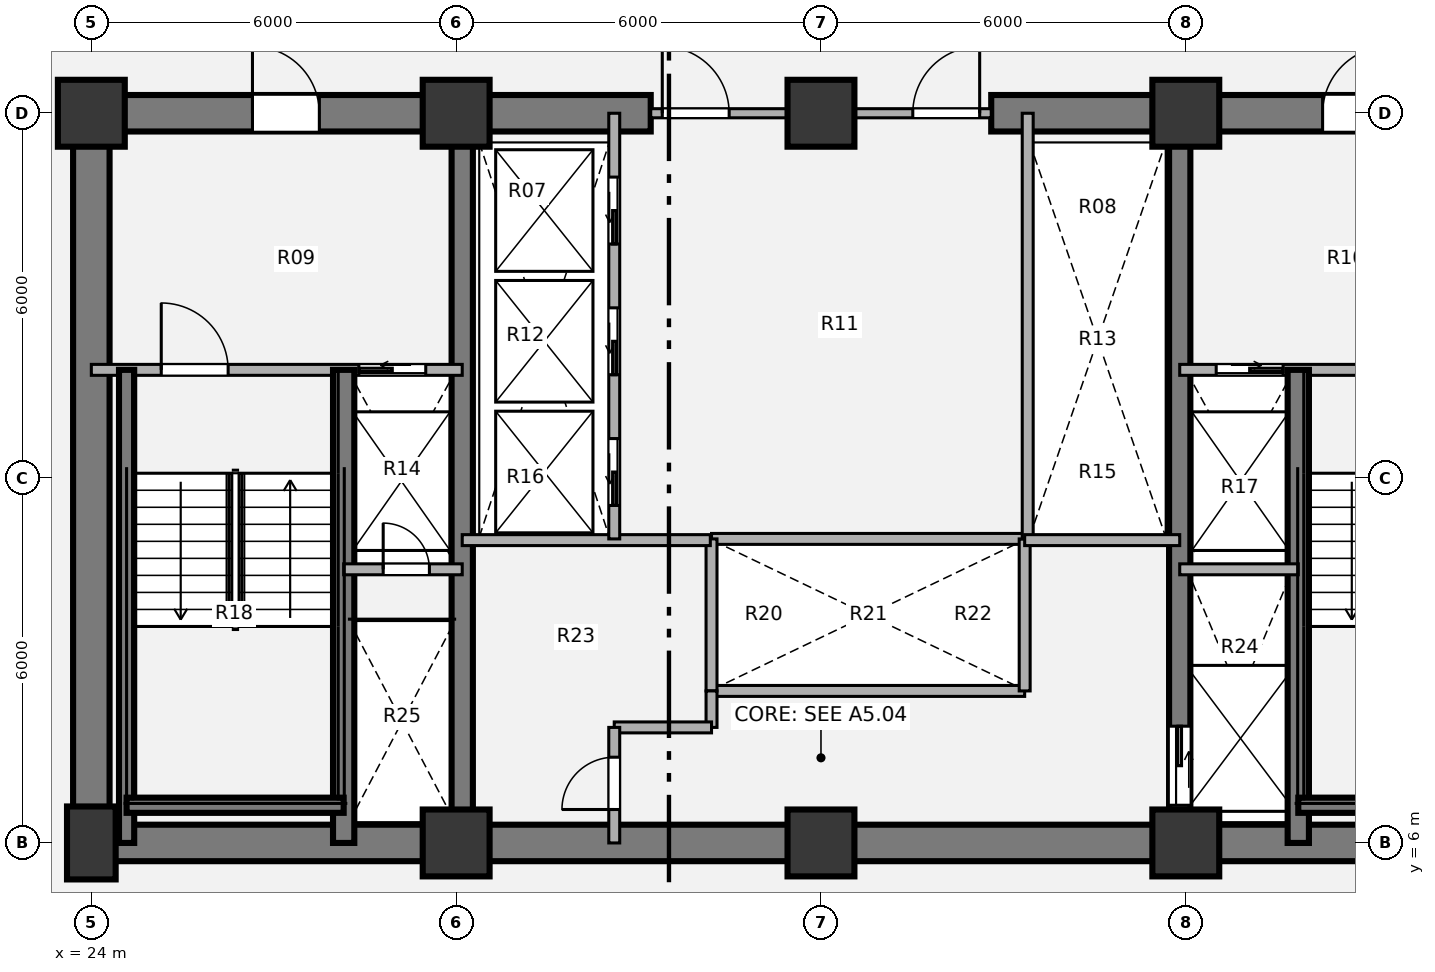
"""IFC4 building model, lengths in metres.
Left out: names, types, materials, properties, quantities, classifications, styles, units other than length and angle.
Written with IfcOpenShell. Run it as: python <this file> out.ifc"""

import sys

from ifc_helpers import new_model, si_unit, direction, frame, frame_2d, origin, origin_2d, place, context, subcontext, project, spatial, rectangle, extrude, source, transform, mapped, element, fill, save


model = new_model("IFC4")
c1 = context("Model", 3, precision=1e-05, world=origin(), true_north=direction((0.0, 1.0)))
c2 = subcontext(c1, "Body", "Model", "MODEL_VIEW")
j1 = project(units=[si_unit("LENGTHUNIT", "METRE"), si_unit("PLANEANGLEUNIT", "RADIAN")], contexts=[c1])
p1 = place(None, origin())
s1 = spatial("IfcSite", under=j1, at=p1, CompositionType="ELEMENT")
p2 = place(p1, origin())
s2 = spatial("IfcBuilding", under=s1, at=p2, CompositionType="ELEMENT")
p3 = place(p2, frame((0.0, 0.0, 27.0)))
s3 = spatial("IfcBuildingStorey", under=s2, at=p3, CompositionType="ELEMENT", Elevation=27.0)
m1 = source(origin(), c2, "Body", "SweptSolid", [
    extrude(rectangle(XDim=0.8, YDim=1.2, at=origin_2d()), origin(), (0.0, 0.0, 1.0), 3.78),
])
p4 = place(p3, frame((24.0, 6.0, 0.0), z_axis=(0.0, 0.0, 1.0), x_axis=(1.0, 0.0, 0.0)))
e1 = element("IfcColumn", 1, at=p4, inside=s3, PredefinedType="COLUMN", context=c2, shape_type="MappedRepresentation", body=[
    mapped(m1, transform((0.0, 0.0, 0.0), x_axis=(1.0, 0.0, 0.0), y_axis=(0.0, 1.0, 0.0), z_axis=(0.0, 0.0, 1.0), scale=1.0)),
])
m2 = source(origin(), c2, "Body", "SweptSolid", [
    extrude(rectangle(XDim=1.1, YDim=1.1, at=origin_2d()), origin(), (0.0, 0.0, 1.0), 3.78),
])
for number, where, z_axis, x_axis in (
    (2, (30.0, 6.0, 0.0), (0.0, 0.0, 1.0), (1.0, 0.0, 0.0)),
    (3, (36.0, 6.0, 0.0), (0.0, 0.0, 1.0), (1.0, 0.0, 0.0)),
    (4, (42.0, 6.0, 0.0), (0.0, 0.0, 1.0), (1.0, 0.0, 0.0)),
    (5, (24.0, 18.0, 0.0), (0.0, 0.0, 1.0), (1.0, 0.0, 0.0)),
    (6, (30.0, 18.0, 0.0), (0.0, 0.0, 1.0), (1.0, 0.0, 0.0)),
    (7, (36.0, 18.0, 0.0), (0.0, 0.0, 1.0), (1.0, 0.0, 0.0)),
    (8, (42.0, 18.0, 0.0), (0.0, 0.0, 1.0), (1.0, 0.0, 0.0)),
):
    element("IfcColumn", number, at=place(p3, frame(where, z_axis=z_axis, x_axis=x_axis)), inside=s3, PredefinedType="COLUMN", context=c2, shape_type="MappedRepresentation", body=[
        mapped(m2, transform((0.0, 0.0, 0.0), x_axis=(1.0, 0.0, 0.0), y_axis=(0.0, 1.0, 0.0), z_axis=(0.0, 0.0, 1.0), scale=1.0)),
    ])
p5 = place(p3, frame((48.3, 6.0, 0.0), z_axis=(0.0, 0.0, 1.0), x_axis=(-1.0, 0.0, 0.0)))
e9 = element("IfcWall", 9, at=p5, inside=s3, PredefinedType="SHEAR", context=c2, shape_type="SweptSolid", body=[
    extrude(rectangle(XDim=24.6, YDim=0.6, at=frame_2d((12.3, 0.0))), origin(), (0.0, 0.0, 1.0), 3.78),
])
p6 = place(p3, frame((24.0, 6.0, 0.0), z_axis=(0.0, 0.0, 1.0), x_axis=(0.0, 1.0, 0.0)))
e10 = element("IfcWall", 10, at=p6, inside=s3, PredefinedType="SHEAR", context=c2, shape_type="SweptSolid", body=[
    extrude(rectangle(XDim=12.0, YDim=0.6, at=frame_2d((6.0, 0.0))), origin(), (0.0, 0.0, 1.0), 3.78),
])
p7 = place(p3, frame((23.7, 18.0, 0.0), z_axis=(0.0, 0.0, 1.0), x_axis=(1.0, 0.0, 0.0)))
e11 = element("IfcWall", 11, at=p7, inside=s3, PredefinedType="SHEAR", context=c2, shape_type="SweptSolid", body=[
    extrude(rectangle(XDim=9.5, YDim=0.6, at=frame_2d((4.75, 0.0))), origin(), (0.0, 0.0, 1.0), 3.78),
])
p8 = place(p7, frame((2.95, 0.0, 0.0)))
e12 = element("IfcOpeningElement", 12, at=p8, cuts=e11, PredefinedType="OPENING", context=c2, shape_type="SweptSolid", body=[
    extrude(rectangle(XDim=1.1, YDim=2.1, at=origin_2d()), frame((0.55, 0.31, 1.05), z_axis=(0.0, -1.0, 0.0), x_axis=(1.0, 0.0, 0.0)), (0.0, 0.0, 1.0), 0.62),
])
p9 = place(p3, frame((38.8, 18.0, 0.0), z_axis=(0.0, 0.0, 1.0), x_axis=(1.0, 0.0, 0.0)))
e13 = element("IfcWall", 13, at=p9, inside=s3, PredefinedType="SHEAR", context=c2, shape_type="SweptSolid", body=[
    extrude(rectangle(XDim=9.5, YDim=0.6, at=frame_2d((4.75, 0.0))), origin(), (0.0, 0.0, 1.0), 3.78),
])
p10 = place(p9, frame((5.45, 0.0, 0.0)))
e14 = element("IfcOpeningElement", 14, at=p10, cuts=e13, PredefinedType="OPENING", context=c2, shape_type="SweptSolid", body=[
    extrude(rectangle(XDim=1.1, YDim=2.1, at=origin_2d()), frame((0.55, 0.31, 1.05), z_axis=(0.0, -1.0, 0.0), x_axis=(1.0, 0.0, 0.0)), (0.0, 0.0, 1.0), 0.62),
])
p11 = place(p3, frame((30.1, 6.0, 0.0), z_axis=(0.0, 0.0, 1.0), x_axis=(0.0, 1.0, 0.0)))
e15 = element("IfcWall", 15, at=p11, inside=s3, PredefinedType="SHEAR", context=c2, shape_type="SweptSolid", body=[
    extrude(rectangle(XDim=12.0, YDim=0.35, at=frame_2d((6.0, 0.0))), origin(), (0.0, 0.0, 1.0), 3.78),
])
p12 = place(p3, frame((41.9, 18.0, 0.0), z_axis=(0.0, 0.0, 1.0), x_axis=(0.0, -1.0, 0.0)))
e16 = element("IfcWall", 16, at=p12, inside=s3, PredefinedType="SHEAR", context=c2, shape_type="SweptSolid", body=[
    extrude(rectangle(XDim=12.0, YDim=0.35, at=frame_2d((6.0, 0.0))), origin(), (0.0, 0.0, 1.0), 3.78),
])
p13 = place(p12, frame((10.08, 0.0, 0.0)))
e17 = element("IfcOpeningElement", 17, at=p13, cuts=e16, PredefinedType="OPENING", context=c2, shape_type="SweptSolid", body=[
    extrude(rectangle(XDim=1.3, YDim=2.1, at=origin_2d()), frame((0.65, 0.185, 1.05), z_axis=(0.0, -1.0, 0.0), x_axis=(1.0, 0.0, 0.0)), (0.0, 0.0, 1.0), 0.37),
])
for number, where, z_axis, x_axis in (
    (18, (34.2, 11.0, 0.0), (0.0, 0.0, 1.0), (1.0, 0.0, 0.0)),
    (19, (34.2, 8.5, 0.0), (0.0, 0.0, 1.0), (1.0, 0.0, 0.0)),
):
    element("IfcWall", number, at=place(p3, frame(where, z_axis=z_axis, x_axis=x_axis)), inside=s3, PredefinedType="PARTITIONING", context=c2, shape_type="SweptSolid", body=[
        extrude(rectangle(XDim=5.15, YDim=0.18, at=frame_2d((2.575, 0.0))), origin(), (0.0, 0.0, 1.0), 3.5),
    ])
for number, where, z_axis, x_axis in (
    (20, (34.2, 8.5, 0.0), (0.0, 0.0, 1.0), (0.0, 1.0, 0.0)),
    (21, (39.35, 8.5, 0.0), (0.0, 0.0, 1.0), (0.0, 1.0, 0.0)),
):
    element("IfcWall", number, at=place(p3, frame(where, z_axis=z_axis, x_axis=x_axis)), inside=s3, PredefinedType="PARTITIONING", context=c2, shape_type="SweptSolid", body=[
        extrude(rectangle(XDim=2.5, YDim=0.18, at=frame_2d((1.25, 0.0))), origin(), (0.0, 0.0, 1.0), 3.5),
    ])
p14 = place(p3, frame((39.4, 11.0, 0.0), z_axis=(0.0, 0.0, 1.0), x_axis=(0.0, 1.0, 0.0)))
e22 = element("IfcWall", 22, at=p14, inside=s3, PredefinedType="PARTITIONING", context=c2, shape_type="SweptSolid", body=[
    extrude(rectangle(XDim=7.0, YDim=0.18, at=frame_2d((3.5, 0.0))), origin(), (0.0, 0.0, 1.0), 3.5),
])
p15 = place(p3, frame((30.1, 10.98, 0.0), z_axis=(0.0, 0.0, 1.0), x_axis=(1.0, 0.0, 0.0)))
e23 = element("IfcWall", 23, at=p15, inside=s3, PredefinedType="PARTITIONING", context=c2, shape_type="SweptSolid", body=[
    extrude(rectangle(XDim=4.08, YDim=0.18, at=frame_2d((2.04, 0.0))), origin(), (0.0, 0.0, 1.0), 3.5),
])
p16 = place(p3, frame((34.2, 7.9, 0.0), z_axis=(0.0, 0.0, 1.0), x_axis=(0.0, 1.0, 0.0)))
e24 = element("IfcWall", 24, at=p16, inside=s3, PredefinedType="PARTITIONING", context=c2, shape_type="SweptSolid", body=[
    extrude(rectangle(XDim=0.6, YDim=0.18, at=frame_2d((0.3, 0.0))), origin(), (0.0, 0.0, 1.0), 3.5),
])
p17 = place(p3, frame((32.6, 7.9, 0.0), z_axis=(0.0, 0.0, 1.0), x_axis=(1.0, 0.0, 0.0)))
e25 = element("IfcWall", 25, at=p17, inside=s3, PredefinedType="PARTITIONING", context=c2, shape_type="SweptSolid", body=[
    extrude(rectangle(XDim=1.6, YDim=0.18, at=frame_2d((0.8, 0.0))), origin(), (0.0, 0.0, 1.0), 3.5),
])
p18 = place(p3, frame((32.6, 6.0, 0.0), z_axis=(0.0, 0.0, 1.0), x_axis=(0.0, 1.0, 0.0)))
e26 = element("IfcWall", 26, at=p18, inside=s3, PredefinedType="PARTITIONING", context=c2, shape_type="SweptSolid", body=[
    extrude(rectangle(XDim=1.9, YDim=0.18, at=frame_2d((0.95, 0.0))), origin(), (0.0, 0.0, 1.0), 3.5),
])
p19 = place(p18, frame((0.55, 0.0, 0.0)))
e27 = element("IfcOpeningElement", 27, at=p19, cuts=e26, PredefinedType="OPENING", context=c2, shape_type="SweptSolid", body=[
    extrude(rectangle(XDim=0.86, YDim=2.1, at=origin_2d()), frame((0.43, 0.1, 1.05), z_axis=(0.0, -1.0, 0.0), x_axis=(1.0, 0.0, 0.0)), (0.0, 0.0, 1.0), 0.2),
])
p20 = place(p3, frame((39.35, 10.98, 0.0), z_axis=(0.0, 0.0, 1.0), x_axis=(1.0, 0.0, 0.0)))
e28 = element("IfcWall", 28, at=p20, inside=s3, PredefinedType="PARTITIONING", context=c2, shape_type="SweptSolid", body=[
    extrude(rectangle(XDim=2.55, YDim=0.18, at=frame_2d((1.275, 0.0))), origin(), (0.0, 0.0, 1.0), 3.5),
])
p21 = place(p3, frame((33.2, 18.0, 0.0), z_axis=(0.0, 0.0, 1.0), x_axis=(1.0, 0.0, 0.0)))
e29 = element("IfcWall", 29, at=p21, inside=s3, PredefinedType="PARTITIONING", context=c2, shape_type="SweptSolid", body=[
    extrude(rectangle(XDim=5.6, YDim=0.15, at=frame_2d((2.8, 0.0))), origin(), (0.0, 0.0, 1.0), 2.315),
])
p22 = place(p21, frame((0.19, 0.0, 0.0)))
e30 = element("IfcOpeningElement", 30, at=p22, cuts=e29, PredefinedType="OPENING", context=c2, shape_type="SweptSolid", body=[
    extrude(rectangle(XDim=1.1, YDim=2.1, at=origin_2d()), frame((0.55, 0.085, 1.05), z_axis=(0.0, -1.0, 0.0), x_axis=(1.0, 0.0, 0.0)), (0.0, 0.0, 1.0), 0.17),
])
p23 = place(p21, frame((4.31, 0.0, 0.0)))
e31 = element("IfcOpeningElement", 31, at=p23, cuts=e29, PredefinedType="OPENING", context=c2, shape_type="SweptSolid", body=[
    extrude(rectangle(XDim=1.1, YDim=2.1, at=origin_2d()), frame((0.55, 0.085, 1.05), z_axis=(0.0, -1.0, 0.0), x_axis=(1.0, 0.0, 0.0)), (0.0, 0.0, 1.0), 0.17),
])
p24 = place(p3, frame((24.0, 13.78, 0.0), z_axis=(0.0, 0.0, 1.0), x_axis=(1.0, 0.0, 0.0)))
e32 = element("IfcWall", 32, at=p24, inside=s3, PredefinedType="PARTITIONING", context=c2, shape_type="SweptSolid", body=[
    extrude(rectangle(XDim=6.1, YDim=0.18, at=frame_2d((3.05, 0.0))), origin(), (0.0, 0.0, 1.0), 3.5),
])
p25 = place(p24, frame((1.15, 0.0, 0.0)))
e33 = element("IfcOpeningElement", 33, at=p25, cuts=e32, PredefinedType="OPENING", context=c2, shape_type="SweptSolid", body=[
    extrude(rectangle(XDim=1.1, YDim=2.1, at=origin_2d()), frame((0.55, 0.1, 1.05), z_axis=(0.0, -1.0, 0.0), x_axis=(1.0, 0.0, 0.0)), (0.0, 0.0, 1.0), 0.2),
])
p26 = place(p24, frame((4.4, 0.0, 0.0)))
e34 = element("IfcOpeningElement", 34, at=p26, cuts=e32, PredefinedType="OPENING", context=c2, shape_type="SweptSolid", body=[
    extrude(rectangle(XDim=1.1, YDim=2.1, at=origin_2d()), frame((0.55, 0.1, 1.05), z_axis=(0.0, -1.0, 0.0), x_axis=(1.0, 0.0, 0.0)), (0.0, 0.0, 1.0), 0.2),
])
p27 = place(p3, frame((28.15, 6.0, 0.0), z_axis=(0.0, 0.0, 1.0), x_axis=(0.0, 1.0, 0.0)))
e35 = element("IfcWall", 35, at=p27, inside=s3, PredefinedType="SHEAR", context=c2, shape_type="SweptSolid", body=[
    extrude(rectangle(XDim=7.78, YDim=0.35, at=frame_2d((3.89, 0.0))), origin(), (0.0, 0.0, 1.0), 3.85),
])
p28 = place(p3, frame((24.58, 6.0, 0.0), z_axis=(0.0, 0.0, 1.0), x_axis=(0.0, 1.0, 0.0)))
e36 = element("IfcWall", 36, at=p28, inside=s3, PredefinedType="SHEAR", context=c2, shape_type="SweptSolid", body=[
    extrude(rectangle(XDim=7.78, YDim=0.25, at=frame_2d((3.89, 0.0))), origin(), (0.0, 0.0, 1.0), 3.85),
])
p29 = place(p3, frame((24.58, 6.62, 0.0), z_axis=(0.0, 0.0, 1.0), x_axis=(1.0, 0.0, 0.0)))
e37 = element("IfcWall", 37, at=p29, inside=s3, PredefinedType="SHEAR", context=c2, shape_type="SweptSolid", body=[
    extrude(rectangle(XDim=3.57, YDim=0.25, at=frame_2d((1.785, 0.0))), origin(), (0.0, 0.0, 1.0), 3.85),
])
p30 = place(p3, frame((28.15, 10.5, 0.0), z_axis=(0.0, 0.0, 1.0), x_axis=(1.0, 0.0, 0.0)))
e38 = element("IfcWall", 38, at=p30, inside=s3, PredefinedType="PARTITIONING", context=c2, shape_type="SweptSolid", body=[
    extrude(rectangle(XDim=1.95, YDim=0.18, at=frame_2d((0.975, 0.0))), origin(), (0.0, 0.0, 1.0), 3.5),
])
p31 = place(p30, frame((0.65, 0.0, 0.0)))
e39 = element("IfcOpeningElement", 39, at=p31, cuts=e38, PredefinedType="OPENING", context=c2, shape_type="SweptSolid", body=[
    extrude(rectangle(XDim=0.76, YDim=2.05, at=origin_2d()), frame((0.38, 0.1, 1.025), z_axis=(0.0, -1.0, 0.0), x_axis=(1.0, 0.0, 0.0)), (0.0, 0.0, 1.0), 0.2),
])
p32 = place(p3, frame((41.9, 13.78, 0.0), z_axis=(0.0, 0.0, 1.0), x_axis=(1.0, 0.0, 0.0)))
e40 = element("IfcWall", 40, at=p32, inside=s3, PredefinedType="PARTITIONING", context=c2, shape_type="SweptSolid", body=[
    extrude(rectangle(XDim=6.1, YDim=0.18, at=frame_2d((3.05, 0.0))), origin(), (0.0, 0.0, 1.0), 3.5),
])
p33 = place(p32, frame((0.6, 0.0, 0.0)))
e41 = element("IfcOpeningElement", 41, at=p33, cuts=e40, PredefinedType="OPENING", context=c2, shape_type="SweptSolid", body=[
    extrude(rectangle(XDim=1.1, YDim=2.1, at=origin_2d()), frame((0.55, 0.1, 1.05), z_axis=(0.0, -1.0, 0.0), x_axis=(1.0, 0.0, 0.0)), (0.0, 0.0, 1.0), 0.2),
])
p34 = place(p32, frame((3.8, 0.0, 0.0)))
e42 = element("IfcOpeningElement", 42, at=p34, cuts=e40, PredefinedType="OPENING", context=c2, shape_type="SweptSolid", body=[
    extrude(rectangle(XDim=1.1, YDim=2.1, at=origin_2d()), frame((0.55, 0.1, 1.05), z_axis=(0.0, -1.0, 0.0), x_axis=(1.0, 0.0, 0.0)), (0.0, 0.0, 1.0), 0.2),
])
p35 = place(p3, frame((43.85, 6.0, 0.0), z_axis=(0.0, 0.0, 1.0), x_axis=(0.0, 1.0, 0.0)))
e43 = element("IfcWall", 43, at=p35, inside=s3, PredefinedType="SHEAR", context=c2, shape_type="SweptSolid", body=[
    extrude(rectangle(XDim=7.78, YDim=0.35, at=frame_2d((3.89, 0.0))), origin(), (0.0, 0.0, 1.0), 3.85),
])
p36 = place(p3, frame((43.85, 6.62, 0.0), z_axis=(0.0, 0.0, 1.0), x_axis=(1.0, 0.0, 0.0)))
e44 = element("IfcWall", 44, at=p36, inside=s3, PredefinedType="SHEAR", context=c2, shape_type="SweptSolid", body=[
    extrude(rectangle(XDim=3.57, YDim=0.25, at=frame_2d((1.785, 0.0))), origin(), (0.0, 0.0, 1.0), 3.85),
])
p37 = place(p3, frame((41.9, 10.5, 0.0), z_axis=(0.0, 0.0, 1.0), x_axis=(1.0, 0.0, 0.0)))
e45 = element("IfcWall", 45, at=p37, inside=s3, PredefinedType="PARTITIONING", context=c2, shape_type="SweptSolid", body=[
    extrude(rectangle(XDim=1.95, YDim=0.18, at=frame_2d((0.975, 0.0))), origin(), (0.0, 0.0, 1.0), 3.5),
])
p38 = place(p3, frame((32.6, 11.0, 0.0), z_axis=(0.0, 0.0, 1.0), x_axis=(0.0, 1.0, 0.0)))
e46 = element("IfcWall", 46, at=p38, inside=s3, PredefinedType="PARTITIONING", context=c2, shape_type="SweptSolid", body=[
    extrude(rectangle(XDim=7.0, YDim=0.18, at=frame_2d((3.5, 0.0))), origin(), (0.0, 0.0, 1.0), 3.5),
])
p39 = place(p38, frame((0.55, 0.0, 0.0)))
e47 = element("IfcOpeningElement", 47, at=p39, cuts=e46, PredefinedType="OPENING", context=c2, shape_type="SweptSolid", body=[
    extrude(rectangle(XDim=1.1, YDim=2.1, at=origin_2d()), frame((0.55, 0.1, 1.05), z_axis=(0.0, -1.0, 0.0), x_axis=(1.0, 0.0, 0.0)), (0.0, 0.0, 1.0), 0.2),
])
p40 = place(p38, frame((2.7, 0.0, 0.0)))
e48 = element("IfcOpeningElement", 48, at=p40, cuts=e46, PredefinedType="OPENING", context=c2, shape_type="SweptSolid", body=[
    extrude(rectangle(XDim=1.1, YDim=2.1, at=origin_2d()), frame((0.55, 0.1, 1.05), z_axis=(0.0, -1.0, 0.0), x_axis=(1.0, 0.0, 0.0)), (0.0, 0.0, 1.0), 0.2),
])
p41 = place(p38, frame((4.85, 0.0, 0.0)))
e49 = element("IfcOpeningElement", 49, at=p41, cuts=e46, PredefinedType="OPENING", context=c2, shape_type="SweptSolid", body=[
    extrude(rectangle(XDim=1.1, YDim=2.1, at=origin_2d()), frame((0.55, 0.1, 1.05), z_axis=(0.0, -1.0, 0.0), x_axis=(1.0, 0.0, 0.0)), (0.0, 0.0, 1.0), 0.2),
])
m3 = source(origin(), c2, "Body", "SweptSolid", [
    extrude(rectangle(XDim=0.86, YDim=2.1, at=origin_2d()), frame((0.43, 0.025, 1.05), z_axis=(0.0, -1.0, 0.0), x_axis=(1.0, 0.0, 0.0)), (0.0, 0.0, 1.0), 0.05),
])
p42 = place(p19, origin())
e50 = element("IfcDoor", 50, at=p42, inside=s3, OperationType="SINGLE_SWING_LEFT", PredefinedType="DOOR", context=c2, shape_type="MappedRepresentation", body=[
    mapped(m3, transform((0.0, 0.0, 0.0), x_axis=(1.0, 0.0, 0.0), y_axis=(0.0, 1.0, 0.0), z_axis=(0.0, 0.0, 1.0), scale=1.0)),
])
fill(e27, e50)
m4 = source(origin(), c2, "Body", "SweptSolid", [
    extrude(rectangle(XDim=1.1, YDim=2.1, at=origin_2d()), frame((0.55, 0.025, 1.05), z_axis=(0.0, -1.0, 0.0), x_axis=(1.0, 0.0, 0.0)), (0.0, 0.0, 1.0), 0.05),
])
p43 = place(p22, origin())
e51 = element("IfcDoor", 51, at=p43, inside=s3, OperationType="SINGLE_SWING_LEFT", PredefinedType="DOOR", context=c2, shape_type="MappedRepresentation", body=[
    mapped(m4, transform((0.0, 0.0, 0.0), x_axis=(1.0, 0.0, 0.0), y_axis=(0.0, 1.0, 0.0), z_axis=(0.0, 0.0, 1.0), scale=1.0)),
])
fill(e30, e51)
p44 = place(p23, origin())
e52 = element("IfcDoor", 52, at=p44, inside=s3, OperationType="SINGLE_SWING_RIGHT", PredefinedType="DOOR", context=c2, shape_type="MappedRepresentation", body=[
    mapped(m4, transform((0.0, 0.0, 0.0), x_axis=(1.0, 0.0, 0.0), y_axis=(0.0, 1.0, 0.0), z_axis=(0.0, 0.0, 1.0), scale=1.0)),
])
fill(e31, e52)
m5 = source(origin(), c2, "Body", "SweptSolid", [
    extrude(rectangle(XDim=1.1, YDim=2.1, at=origin_2d()), frame((0.55, 0.025, 1.05), z_axis=(0.0, -1.0, 0.0), x_axis=(1.0, 0.0, 0.0)), (0.0, 0.0, 1.0), 0.05),
])
p45 = place(p25, origin())
e53 = element("IfcDoor", 53, at=p45, inside=s3, OperationType="SINGLE_SWING_LEFT", PredefinedType="DOOR", context=c2, shape_type="MappedRepresentation", body=[
    mapped(m5, transform((0.0, 0.0, 0.0), x_axis=(1.0, 0.0, 0.0), y_axis=(0.0, 1.0, 0.0), z_axis=(0.0, 0.0, 1.0), scale=1.0)),
])
fill(e33, e53)
m6 = source(origin(), c2, "Body", "SweptSolid", [
    extrude(rectangle(XDim=1.1, YDim=2.1, at=origin_2d()), frame((0.55, 0.025, 1.05), z_axis=(0.0, -1.0, 0.0), x_axis=(1.0, 0.0, 0.0)), (0.0, 0.0, 1.0), 0.05),
])
p46 = place(p26, origin())
e54 = element("IfcDoor", 54, at=p46, inside=s3, OperationType="SLIDING_TO_LEFT", PredefinedType="DOOR", context=c2, shape_type="MappedRepresentation", body=[
    mapped(m6, transform((0.0, 0.0, 0.0), x_axis=(1.0, 0.0, 0.0), y_axis=(0.0, 1.0, 0.0), z_axis=(0.0, 0.0, 1.0), scale=1.0)),
])
fill(e34, e54)
m7 = source(origin(), c2, "Body", "SweptSolid", [
    extrude(rectangle(XDim=0.76, YDim=2.05, at=origin_2d()), frame((0.38, 0.025, 1.025), z_axis=(0.0, -1.0, 0.0), x_axis=(1.0, 0.0, 0.0)), (0.0, 0.0, 1.0), 0.05),
])
p47 = place(p31, origin())
e55 = element("IfcDoor", 55, at=p47, inside=s3, OperationType="SINGLE_SWING_LEFT", PredefinedType="DOOR", context=c2, shape_type="MappedRepresentation", body=[
    mapped(m7, transform((0.0, 0.0, 0.0), x_axis=(1.0, 0.0, 0.0), y_axis=(0.0, 1.0, 0.0), z_axis=(0.0, 0.0, 1.0), scale=1.0)),
])
fill(e39, e55)
p48 = place(p33, origin())
e56 = element("IfcDoor", 56, at=p48, inside=s3, OperationType="SLIDING_TO_RIGHT", PredefinedType="DOOR", context=c2, shape_type="MappedRepresentation", body=[
    mapped(m6, transform((0.0, 0.0, 0.0), x_axis=(1.0, 0.0, 0.0), y_axis=(0.0, 1.0, 0.0), z_axis=(0.0, 0.0, 1.0), scale=1.0)),
])
fill(e41, e56)
m8 = source(origin(), c2, "Body", "SweptSolid", [
    extrude(rectangle(XDim=1.3, YDim=2.1, at=origin_2d()), frame((0.65, 0.025, 1.05), z_axis=(0.0, -1.0, 0.0), x_axis=(1.0, 0.0, 0.0)), (0.0, 0.0, 1.0), 0.05),
])
p49 = place(p13, origin())
e57 = element("IfcDoor", 57, at=p49, inside=s3, OperationType="SLIDING_TO_LEFT", PredefinedType="DOOR", context=c2, shape_type="MappedRepresentation", body=[
    mapped(m8, transform((0.0, 0.0, 0.0), x_axis=(1.0, 0.0, 0.0), y_axis=(0.0, 1.0, 0.0), z_axis=(0.0, 0.0, 1.0), scale=1.0)),
])
fill(e17, e57)
p50 = place(p8, origin())
e58 = element("IfcDoor", 58, at=p50, inside=s3, OperationType="SINGLE_SWING_LEFT", PredefinedType="DOOR", context=c2, shape_type="MappedRepresentation", body=[
    mapped(m4, transform((0.0, 0.0, 0.0), x_axis=(1.0, 0.0, 0.0), y_axis=(0.0, 1.0, 0.0), z_axis=(0.0, 0.0, 1.0), scale=1.0)),
])
fill(e12, e58)
p51 = place(p10, origin())
e59 = element("IfcDoor", 59, at=p51, inside=s3, OperationType="SINGLE_SWING_RIGHT", PredefinedType="DOOR", context=c2, shape_type="MappedRepresentation", body=[
    mapped(m4, transform((0.0, 0.0, 0.0), x_axis=(1.0, 0.0, 0.0), y_axis=(0.0, 1.0, 0.0), z_axis=(0.0, 0.0, 1.0), scale=1.0)),
])
fill(e14, e59)
p52 = place(p39, origin())
e60 = element("IfcDoor", 60, at=p52, inside=s3, OperationType="SLIDING_TO_LEFT", PredefinedType="DOOR", context=c2, shape_type="MappedRepresentation", body=[
    mapped(m6, transform((0.0, 0.0, 0.0), x_axis=(1.0, 0.0, 0.0), y_axis=(0.0, 1.0, 0.0), z_axis=(0.0, 0.0, 1.0), scale=1.0)),
])
fill(e47, e60)
p53 = place(p40, origin())
e61 = element("IfcDoor", 61, at=p53, inside=s3, OperationType="SLIDING_TO_LEFT", PredefinedType="DOOR", context=c2, shape_type="MappedRepresentation", body=[
    mapped(m6, transform((0.0, 0.0, 0.0), x_axis=(1.0, 0.0, 0.0), y_axis=(0.0, 1.0, 0.0), z_axis=(0.0, 0.0, 1.0), scale=1.0)),
])
fill(e48, e61)
p54 = place(p41, origin())
e62 = element("IfcDoor", 62, at=p54, inside=s3, OperationType="SLIDING_TO_LEFT", PredefinedType="DOOR", context=c2, shape_type="MappedRepresentation", body=[
    mapped(m6, transform((0.0, 0.0, 0.0), x_axis=(1.0, 0.0, 0.0), y_axis=(0.0, 1.0, 0.0), z_axis=(0.0, 0.0, 1.0), scale=1.0)),
])
fill(e49, e62)
save(model, sys.argv[1])
